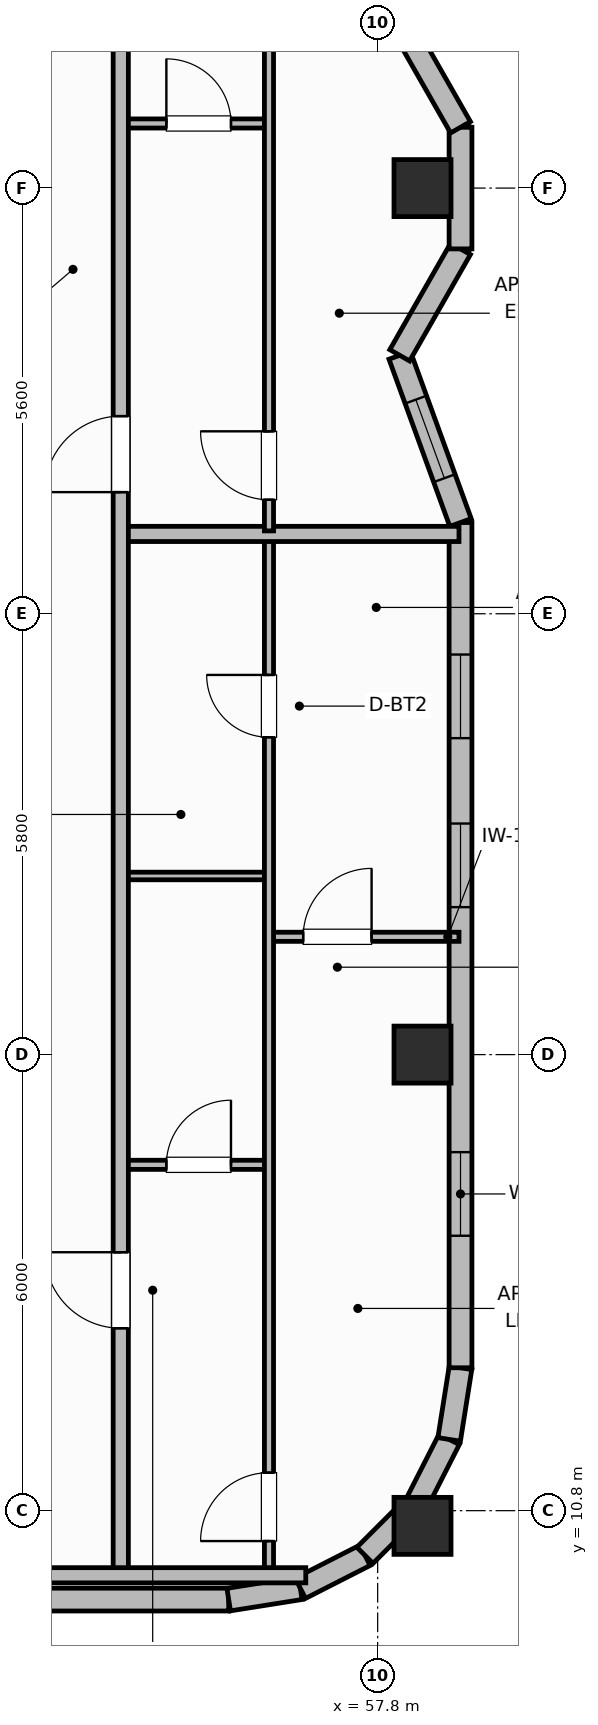
"""IFC4 building model, lengths in metres.
Left out: names, types, materials, properties, quantities, classifications, styles, units other than length and angle.
Written with IfcOpenShell. Run it as: python <this file> out.ifc"""

import sys

from ifc_helpers import new_model, si_unit, direction, frame, frame_2d, origin, origin_2d, place, context, subcontext, project, spatial, rectangle, extrude, element, fill, save


model = new_model("IFC4")
c1 = context("Model", 3, precision=1e-05, world=origin(), true_north=direction((0.0, 1.0)))
c2 = subcontext(c1, "Body", "Model", "MODEL_VIEW")
j1 = project(units=[si_unit("LENGTHUNIT", "METRE"), si_unit("PLANEANGLEUNIT", "RADIAN")], contexts=[c1])
p1 = place(None, origin())
s1 = spatial("IfcSite", under=j1, at=p1, CompositionType="ELEMENT")
p2 = place(p1, origin())
s2 = spatial("IfcBuilding", under=s1, at=p2, CompositionType="ELEMENT")
p3 = place(p2, frame((0.0, 0.0, 267.6)))
s3 = spatial("IfcBuildingStorey", under=s2, at=p3, CompositionType="ELEMENT", Elevation=267.6)
for number, where, z_axis, x_axis in (
    (1, (58.39, 10.6, 0.0), (0.0, 0.0, 1.0), (1.0, 0.0, 0.0)),
    (2, (58.39, 16.8, 0.0), (0.0, 0.0, 1.0), (1.0, 0.0, 0.0)),
    (3, (58.39, 28.2, 0.0), (0.0, 0.0, 1.0), (1.0, 0.0, 0.0)),
):
    element("IfcColumn", number, at=place(p3, frame(where, z_axis=z_axis, x_axis=x_axis)), inside=s3, PredefinedType="COLUMN", context=c2, shape_type="SweptSolid", body=[
        extrude(rectangle(XDim=0.75, YDim=0.75, at=origin_2d()), origin(), (0.0, 0.0, 1.0), 3.7),
    ])
p4 = place(p3, frame((22.56, 9.63, 0.0), z_axis=(0.0, 0.0, 1.0), x_axis=(1.0, 0.0, 0.0)))
e4 = element("IfcWall", 4, at=p4, inside=s3, PredefinedType="SOLIDWALL", context=c2, shape_type="SweptSolid", body=[
    extrude(rectangle(XDim=33.28, YDim=0.3, at=frame_2d((16.64, 0.0))), origin(), (0.0, 0.0, 1.0), 2.73),
])
p5 = place(p4, frame((4.311, 0.0, 0.76)))
e5 = element("IfcOpeningElement", 5, at=p5, cuts=e4, PredefinedType="OPENING", context=c2, shape_type="SweptSolid", body=[
    extrude(rectangle(XDim=1.4, YDim=1.85, at=frame_2d((0.7, 0.925))), frame((0.0, 0.16, 0.0), z_axis=(0.0, -1.0, 0.0), x_axis=(1.0, 0.0, 0.0)), (0.0, 0.0, 1.0), 0.32),
])
p6 = place(p4, frame((7.218, 0.0, 0.76)))
e6 = element("IfcOpeningElement", 6, at=p6, cuts=e4, PredefinedType="OPENING", context=c2, shape_type="SweptSolid", body=[
    extrude(rectangle(XDim=1.4, YDim=1.85, at=frame_2d((0.7, 0.925))), frame((0.0, 0.16, 0.0), z_axis=(0.0, -1.0, 0.0), x_axis=(1.0, 0.0, 0.0)), (0.0, 0.0, 1.0), 0.32),
])
p7 = place(p4, frame((9.775, 0.0, 0.76)))
e7 = element("IfcOpeningElement", 7, at=p7, cuts=e4, PredefinedType="OPENING", context=c2, shape_type="SweptSolid", body=[
    extrude(rectangle(XDim=1.4, YDim=1.85, at=frame_2d((0.7, 0.925))), frame((0.0, 0.16, 0.0), z_axis=(0.0, -1.0, 0.0), x_axis=(1.0, 0.0, 0.0)), (0.0, 0.0, 1.0), 0.32),
])
p8 = place(p4, frame((14.083, 0.0, 0.76)))
e8 = element("IfcOpeningElement", 8, at=p8, cuts=e4, PredefinedType="OPENING", context=c2, shape_type="SweptSolid", body=[
    extrude(rectangle(XDim=1.4, YDim=1.85, at=frame_2d((0.7, 0.925))), frame((0.0, 0.16, 0.0), z_axis=(0.0, -1.0, 0.0), x_axis=(1.0, 0.0, 0.0)), (0.0, 0.0, 1.0), 0.32),
])
p9 = place(p4, frame((15.94, 0.0, 0.76)))
e9 = element("IfcOpeningElement", 9, at=p9, cuts=e4, PredefinedType="OPENING", context=c2, shape_type="SweptSolid", body=[
    extrude(rectangle(XDim=1.4, YDim=1.85, at=frame_2d((0.7, 0.925))), frame((0.0, 0.16, 0.0), z_axis=(0.0, -1.0, 0.0), x_axis=(1.0, 0.0, 0.0)), (0.0, 0.0, 1.0), 0.32),
])
p10 = place(p4, frame((17.797, 0.0, 0.76)))
e10 = element("IfcOpeningElement", 10, at=p10, cuts=e4, PredefinedType="OPENING", context=c2, shape_type="SweptSolid", body=[
    extrude(rectangle(XDim=1.4, YDim=1.85, at=frame_2d((0.7, 0.925))), frame((0.0, 0.16, 0.0), z_axis=(0.0, -1.0, 0.0), x_axis=(1.0, 0.0, 0.0)), (0.0, 0.0, 1.0), 0.32),
])
p11 = place(p4, frame((22.104, 0.0, 0.76)))
e11 = element("IfcOpeningElement", 11, at=p11, cuts=e4, PredefinedType="OPENING", context=c2, shape_type="SweptSolid", body=[
    extrude(rectangle(XDim=1.4, YDim=1.85, at=frame_2d((0.7, 0.925))), frame((0.0, 0.16, 0.0), z_axis=(0.0, -1.0, 0.0), x_axis=(1.0, 0.0, 0.0)), (0.0, 0.0, 1.0), 0.32),
])
p12 = place(p4, frame((24.662, 0.0, 0.76)))
e12 = element("IfcOpeningElement", 12, at=p12, cuts=e4, PredefinedType="OPENING", context=c2, shape_type="SweptSolid", body=[
    extrude(rectangle(XDim=1.4, YDim=1.85, at=frame_2d((0.7, 0.925))), frame((0.0, 0.16, 0.0), z_axis=(0.0, -1.0, 0.0), x_axis=(1.0, 0.0, 0.0)), (0.0, 0.0, 1.0), 0.32),
])
p13 = place(p4, frame((27.569, 0.0, 0.76)))
e13 = element("IfcOpeningElement", 13, at=p13, cuts=e4, PredefinedType="OPENING", context=c2, shape_type="SweptSolid", body=[
    extrude(rectangle(XDim=1.4, YDim=1.85, at=frame_2d((0.7, 0.925))), frame((0.0, 0.16, 0.0), z_axis=(0.0, -1.0, 0.0), x_axis=(1.0, 0.0, 0.0)), (0.0, 0.0, 1.0), 0.32),
])
p14 = place(p3, frame((55.84, 9.63, 0.0), z_axis=(0.0, 0.0, 1.0), x_axis=(0.987663181641, 0.156593229835, 0.0)))
e14 = element("IfcWall", 14, at=p14, inside=s3, PredefinedType="SOLIDWALL", context=c2, shape_type="SweptSolid", body=[
    extrude(rectangle(XDim=0.954, YDim=0.3, at=frame_2d((0.477, 0.0))), origin(), (0.0, 0.0, 1.0), 2.73),
])
for number, where, z_axis, x_axis in (
    (15, (56.782, 9.779, 0.0), (0.0, 0.0, 1.0), (0.891, 0.454, 0.0)),
    (16, (57.633, 10.212, 0.0), (0.0, 0.0, 1.0), (0.707, 0.707, 0.0)),
    (17, (58.308, 10.887, 0.0), (0.0, 0.0, 1.0), (0.454, 0.891, 0.0)),
):
    element("IfcWall", number, at=place(p3, frame(where, z_axis=z_axis, x_axis=x_axis)), inside=s3, PredefinedType="SOLIDWALL", context=c2, shape_type="SweptSolid", body=[
        extrude(rectangle(XDim=0.954, YDim=0.3, at=frame_2d((0.477, 0.0))), origin(), (0.0, 0.0, 1.0), 2.73),
    ])
p15 = place(p3, frame((58.741, 11.738, 0.0), z_axis=(0.0, 0.0, 1.0), x_axis=(0.156343617883, 0.987702725088, 0.0)))
e18 = element("IfcWall", 18, at=p15, inside=s3, PredefinedType="SOLIDWALL", context=c2, shape_type="SweptSolid", body=[
    extrude(rectangle(XDim=0.954, YDim=0.3, at=frame_2d((0.477, 0.0))), origin(), (0.0, 0.0, 1.0), 2.73),
])
p16 = place(p3, frame((58.89, 12.68, 0.0), z_axis=(0.0, 0.0, 1.0), x_axis=(0.0, 1.0, 0.0)))
e19 = element("IfcWall", 19, at=p16, inside=s3, PredefinedType="SOLIDWALL", context=c2, shape_type="SweptSolid", body=[
    extrude(rectangle(XDim=11.12, YDim=0.3, at=frame_2d((5.56, 0.0))), origin(), (0.0, 0.0, 1.0), 2.73),
])
p17 = place(p16, frame((1.737, 0.0, 0.95)))
e20 = element("IfcOpeningElement", 20, at=p17, cuts=e19, PredefinedType="OPENING", context=c2, shape_type="SweptSolid", body=[
    extrude(rectangle(XDim=1.1, YDim=1.65, at=frame_2d((0.55, 0.825))), frame((0.0, 0.16, 0.0), z_axis=(0.0, -1.0, 0.0), x_axis=(1.0, 0.0, 0.0)), (0.0, 0.0, 1.0), 0.32),
])
p18 = place(p16, frame((6.06, 0.0, 0.95)))
e21 = element("IfcOpeningElement", 21, at=p18, cuts=e19, PredefinedType="OPENING", context=c2, shape_type="SweptSolid", body=[
    extrude(rectangle(XDim=1.1, YDim=1.65, at=frame_2d((0.55, 0.825))), frame((0.0, 0.16, 0.0), z_axis=(0.0, -1.0, 0.0), x_axis=(1.0, 0.0, 0.0)), (0.0, 0.0, 1.0), 0.32),
])
p19 = place(p16, frame((8.283, 0.0, 0.95)))
e22 = element("IfcOpeningElement", 22, at=p19, cuts=e19, PredefinedType="OPENING", context=c2, shape_type="SweptSolid", body=[
    extrude(rectangle(XDim=1.1, YDim=1.65, at=frame_2d((0.55, 0.825))), frame((0.0, 0.16, 0.0), z_axis=(0.0, -1.0, 0.0), x_axis=(1.0, 0.0, 0.0)), (0.0, 0.0, 1.0), 0.32),
])
p20 = place(p3, frame((58.89, 23.8, 0.0), z_axis=(0.0, 0.0, 1.0), x_axis=(-0.341676068702, 0.939817782379, 0.0)))
e23 = element("IfcWall", 23, at=p20, inside=s3, PredefinedType="SOLIDWALL", context=c2, shape_type="SweptSolid", body=[
    extrude(rectangle(XDim=2.341, YDim=0.3, at=frame_2d((1.17, 0.0))), origin(), (0.0, 0.0, 1.0), 2.73),
])
p21 = place(p20, frame((0.621, 0.0, 0.92)))
e24 = element("IfcOpeningElement", 24, at=p21, cuts=e23, PredefinedType="OPENING", context=c2, shape_type="SweptSolid", body=[
    extrude(rectangle(XDim=1.1, YDim=1.65, at=frame_2d((0.55, 0.825))), frame((0.0, 0.16, 0.0), z_axis=(0.0, -1.0, 0.0), x_axis=(1.0, 0.0, 0.0)), (0.0, 0.0, 1.0), 0.32),
])
p22 = place(p3, frame((58.09, 26.0, 0.0), z_axis=(0.0, 0.0, 1.0), x_axis=(0.496073707015, 0.868280413927, 0.0)))
e25 = element("IfcWall", 25, at=p22, inside=s3, PredefinedType="SOLIDWALL", context=c2, shape_type="SweptSolid", body=[
    extrude(rectangle(XDim=1.612, YDim=0.3, at=frame_2d((0.806, 0.0))), origin(), (0.0, 0.0, 1.0), 2.73),
])
p23 = place(p3, frame((58.89, 27.4, 0.0), z_axis=(0.0, 0.0, 1.0), x_axis=(0.0, 1.0, 0.0)))
e26 = element("IfcWall", 26, at=p23, inside=s3, PredefinedType="SOLIDWALL", context=c2, shape_type="SweptSolid", body=[
    extrude(rectangle(XDim=1.6, YDim=0.3, at=frame_2d((0.8, 0.0))), origin(), (0.0, 0.0, 1.0), 2.73),
])
p24 = place(p3, frame((58.89, 29.0, 0.0), z_axis=(0.0, 0.0, 1.0), x_axis=(-0.496073707015, 0.868280413927, 0.0)))
e27 = element("IfcWall", 27, at=p24, inside=s3, PredefinedType="SOLIDWALL", context=c2, shape_type="SweptSolid", body=[
    extrude(rectangle(XDim=1.612, YDim=0.3, at=frame_2d((0.806, 0.0))), origin(), (0.0, 0.0, 1.0), 2.73),
])
p25 = place(p3, frame((54.42, 15.35, 0.0), z_axis=(0.0, 0.0, 1.0), x_axis=(1.0, 0.0, 0.0)))
e28 = element("IfcWall", 28, at=p25, inside=s3, PredefinedType="PARTITIONING", context=c2, shape_type="SweptSolid", body=[
    extrude(rectangle(XDim=1.95, YDim=0.12, at=frame_2d((0.975, 0.0))), origin(), (0.0, 0.0, 1.0), 2.56),
])
p26 = place(p25, frame((0.6, 0.0, 0.0)))
e29 = element("IfcOpeningElement", 29, at=p26, cuts=e28, PredefinedType="OPENING", context=c2, shape_type="SweptSolid", body=[
    extrude(rectangle(XDim=0.85, YDim=2.1, at=frame_2d((0.425, 1.05))), frame((0.0, 0.07, 0.0), z_axis=(0.0, -1.0, 0.0), x_axis=(1.0, 0.0, 0.0)), (0.0, 0.0, 1.0), 0.14),
])
p27 = place(p3, frame((54.42, 19.15, 0.0), z_axis=(0.0, 0.0, 1.0), x_axis=(1.0, 0.0, 0.0)))
e30 = element("IfcWall", 30, at=p27, inside=s3, PredefinedType="PARTITIONING", context=c2, shape_type="SweptSolid", body=[
    extrude(rectangle(XDim=1.95, YDim=0.1, at=frame_2d((0.975, 0.0))), origin(), (0.0, 0.0, 1.0), 2.56),
])
p28 = place(p3, frame((56.37, 18.35, 0.0), z_axis=(0.0, 0.0, 1.0), x_axis=(1.0, 0.0, 0.0)))
e31 = element("IfcWall", 31, at=p28, inside=s3, PredefinedType="PARTITIONING", context=c2, shape_type="SweptSolid", body=[
    extrude(rectangle(XDim=2.5, YDim=0.12, at=frame_2d((1.25, 0.0))), origin(), (0.0, 0.0, 1.0), 2.56),
])
p29 = place(p28, frame((0.45, 0.0, 0.0)))
e32 = element("IfcOpeningElement", 32, at=p29, cuts=e31, PredefinedType="OPENING", context=c2, shape_type="SweptSolid", body=[
    extrude(rectangle(XDim=0.9, YDim=2.1, at=frame_2d((0.45, 1.05))), frame((0.0, 0.07, 0.0), z_axis=(0.0, -1.0, 0.0), x_axis=(1.0, 0.0, 0.0)), (0.0, 0.0, 1.0), 0.14),
])
p30 = place(p3, frame((56.37, 9.99, 0.0), z_axis=(0.0, 0.0, 1.0), x_axis=(0.0, 1.0, 0.0)))
e33 = element("IfcWall", 33, at=p30, inside=s3, PredefinedType="PARTITIONING", context=c2, shape_type="SweptSolid", body=[
    extrude(rectangle(XDim=13.62, YDim=0.12, at=frame_2d((6.81, 0.0))), origin(), (0.0, 0.0, 1.0), 2.56),
])
p31 = place(p30, frame((0.41, 0.0, 0.0)))
e34 = element("IfcOpeningElement", 34, at=p31, cuts=e33, PredefinedType="OPENING", context=c2, shape_type="SweptSolid", body=[
    extrude(rectangle(XDim=0.9, YDim=2.1, at=frame_2d((0.45, 1.05))), frame((0.0, 0.07, 0.0), z_axis=(0.0, -1.0, 0.0), x_axis=(1.0, 0.0, 0.0)), (0.0, 0.0, 1.0), 0.14),
])
p32 = place(p30, frame((10.985, 0.0, 0.0)))
e35 = element("IfcOpeningElement", 35, at=p32, cuts=e33, PredefinedType="OPENING", context=c2, shape_type="SweptSolid", body=[
    extrude(rectangle(XDim=0.82, YDim=2.08, at=frame_2d((0.41, 1.04))), frame((0.0, 0.07, 0.0), z_axis=(0.0, -1.0, 0.0), x_axis=(1.0, 0.0, 0.0)), (0.0, 0.0, 1.0), 0.14),
])
p33 = place(p3, frame((54.42, 23.65, 0.0), z_axis=(0.0, 0.0, 1.0), x_axis=(1.0, 0.0, 0.0)))
e36 = element("IfcWall", 36, at=p33, inside=s3, PredefinedType="PARTITIONING", context=c2, shape_type="SweptSolid", body=[
    extrude(rectangle(XDim=4.45, YDim=0.2, at=frame_2d((2.225, 0.0))), origin(), (0.0, 0.0, 1.0), 2.56),
])
p34 = place(p3, frame((54.42, 29.05, 0.0), z_axis=(0.0, 0.0, 1.0), x_axis=(1.0, 0.0, 0.0)))
e37 = element("IfcWall", 37, at=p34, inside=s3, PredefinedType="PARTITIONING", context=c2, shape_type="SweptSolid", body=[
    extrude(rectangle(XDim=1.95, YDim=0.12, at=frame_2d((0.975, 0.0))), origin(), (0.0, 0.0, 1.0), 2.56),
])
p35 = place(p34, frame((0.6, 0.0, 0.0)))
e38 = element("IfcOpeningElement", 38, at=p35, cuts=e37, PredefinedType="OPENING", context=c2, shape_type="SweptSolid", body=[
    extrude(rectangle(XDim=0.85, YDim=2.1, at=frame_2d((0.425, 1.05))), frame((0.0, 0.07, 0.0), z_axis=(0.0, -1.0, 0.0), x_axis=(1.0, 0.0, 0.0)), (0.0, 0.0, 1.0), 0.14),
])
p36 = place(p3, frame((56.37, 23.69, 0.0), z_axis=(0.0, 0.0, 1.0), x_axis=(0.0, 1.0, 0.0)))
e39 = element("IfcWall", 39, at=p36, inside=s3, PredefinedType="PARTITIONING", context=c2, shape_type="SweptSolid", body=[
    extrude(rectangle(XDim=22.72, YDim=0.12, at=frame_2d((11.36, 0.0))), origin(), (0.0, 0.0, 1.0), 2.56),
])
p37 = place(p36, frame((0.41, 0.0, 0.0)))
e40 = element("IfcOpeningElement", 40, at=p37, cuts=e39, PredefinedType="OPENING", context=c2, shape_type="SweptSolid", body=[
    extrude(rectangle(XDim=0.9, YDim=2.1, at=frame_2d((0.45, 1.05))), frame((0.0, 0.07, 0.0), z_axis=(0.0, -1.0, 0.0), x_axis=(1.0, 0.0, 0.0)), (0.0, 0.0, 1.0), 0.14),
])
p38 = place(p36, frame((13.185, 0.0, 0.0)))
e41 = element("IfcOpeningElement", 41, at=p38, cuts=e39, PredefinedType="OPENING", context=c2, shape_type="SweptSolid", body=[
    extrude(rectangle(XDim=0.82, YDim=2.08, at=frame_2d((0.41, 1.04))), frame((0.0, 0.07, 0.0), z_axis=(0.0, -1.0, 0.0), x_axis=(1.0, 0.0, 0.0)), (0.0, 0.0, 1.0), 0.14),
])
p39 = place(p3, frame((54.42, 9.95, 0.0), z_axis=(0.0, 0.0, 1.0), x_axis=(0.0, 1.0, 0.0)))
e42 = element("IfcWall", 42, at=p39, inside=s3, PredefinedType="PARTITIONING", context=c2, shape_type="SweptSolid", body=[
    extrude(rectangle(XDim=36.5, YDim=0.2, at=frame_2d((18.25, 0.0))), origin(), (0.0, 0.0, 1.0), 2.56),
])
p40 = place(p39, frame((3.25, 0.0, 0.0)))
e43 = element("IfcOpeningElement", 43, at=p40, cuts=e42, PredefinedType="OPENING", context=c2, shape_type="SweptSolid", body=[
    extrude(rectangle(XDim=1.0, YDim=2.15, at=frame_2d((0.5, 1.075))), frame((0.0, 0.11, 0.0), z_axis=(0.0, -1.0, 0.0), x_axis=(1.0, 0.0, 0.0)), (0.0, 0.0, 1.0), 0.22),
])
p41 = place(p39, frame((14.25, 0.0, 0.0)))
e44 = element("IfcOpeningElement", 44, at=p41, cuts=e42, PredefinedType="OPENING", context=c2, shape_type="SweptSolid", body=[
    extrude(rectangle(XDim=1.0, YDim=2.15, at=frame_2d((0.5, 1.075))), frame((0.0, 0.11, 0.0), z_axis=(0.0, -1.0, 0.0), x_axis=(1.0, 0.0, 0.0)), (0.0, 0.0, 1.0), 0.22),
])
p42 = place(p3, frame((53.1, 9.95, 0.0), z_axis=(0.0, 0.0, 1.0), x_axis=(1.0, 0.0, 0.0)))
e45 = element("IfcWall", 45, at=p42, inside=s3, PredefinedType="PARTITIONING", context=c2, shape_type="SweptSolid", body=[
    extrude(rectangle(XDim=3.754, YDim=0.2, at=frame_2d((1.877, 0.0))), origin(), (0.0, 0.0, 1.0), 2.56),
])
p43 = place(p17, origin())
e46 = element("IfcWindow", 46, at=p43, inside=s3, PartitioningType="SINGLE_PANEL", PredefinedType="WINDOW", context=c2, shape_type="SweptSolid", body=[
    extrude(rectangle(XDim=1.1, YDim=1.65, at=frame_2d((0.55, 0.825))), frame((0.0, 0.03, 0.0), z_axis=(0.0, -1.0, 0.0), x_axis=(1.0, 0.0, 0.0)), (0.0, 0.0, 1.0), 0.06),
])
fill(e20, e46)
p44 = place(p18, origin())
e47 = element("IfcWindow", 47, at=p44, inside=s3, PartitioningType="SINGLE_PANEL", PredefinedType="WINDOW", context=c2, shape_type="SweptSolid", body=[
    extrude(rectangle(XDim=1.1, YDim=1.65, at=frame_2d((0.55, 0.825))), frame((0.0, 0.03, 0.0), z_axis=(0.0, -1.0, 0.0), x_axis=(1.0, 0.0, 0.0)), (0.0, 0.0, 1.0), 0.06),
])
fill(e21, e47)
p45 = place(p19, origin())
e48 = element("IfcWindow", 48, at=p45, inside=s3, PartitioningType="SINGLE_PANEL", PredefinedType="WINDOW", context=c2, shape_type="SweptSolid", body=[
    extrude(rectangle(XDim=1.1, YDim=1.65, at=frame_2d((0.55, 0.825))), frame((0.0, 0.03, 0.0), z_axis=(0.0, -1.0, 0.0), x_axis=(1.0, 0.0, 0.0)), (0.0, 0.0, 1.0), 0.06),
])
fill(e22, e48)
p46 = place(p21, origin())
e49 = element("IfcWindow", 49, at=p46, inside=s3, PartitioningType="SINGLE_PANEL", PredefinedType="WINDOW", context=c2, shape_type="SweptSolid", body=[
    extrude(rectangle(XDim=1.1, YDim=1.65, at=frame_2d((0.55, 0.825))), frame((0.0, 0.03, 0.0), z_axis=(0.0, -1.0, 0.0), x_axis=(1.0, 0.0, 0.0)), (0.0, 0.0, 1.0), 0.06),
])
fill(e24, e49)
p47 = place(p26, origin())
e50 = element("IfcDoor", 50, at=p47, inside=s3, OperationType="SINGLE_SWING_RIGHT", PredefinedType="DOOR", context=c2, shape_type="SweptSolid", body=[
    extrude(rectangle(XDim=0.85, YDim=2.1, at=frame_2d((0.425, 1.05))), frame((0.0, 0.025, 0.0), z_axis=(0.0, -1.0, 0.0), x_axis=(1.0, 0.0, 0.0)), (0.0, 0.0, 1.0), 0.05),
])
fill(e29, e50)
p48 = place(p29, origin())
e51 = element("IfcDoor", 51, at=p48, inside=s3, OperationType="SINGLE_SWING_RIGHT", PredefinedType="DOOR", context=c2, shape_type="SweptSolid", body=[
    extrude(rectangle(XDim=0.9, YDim=2.1, at=frame_2d((0.45, 1.05))), frame((0.0, 0.025, 0.0), z_axis=(0.0, -1.0, 0.0), x_axis=(1.0, 0.0, 0.0)), (0.0, 0.0, 1.0), 0.05),
])
fill(e32, e51)
p49 = place(p31, origin())
e52 = element("IfcDoor", 52, at=p49, inside=s3, OperationType="SINGLE_SWING_LEFT", PredefinedType="DOOR", context=c2, shape_type="SweptSolid", body=[
    extrude(rectangle(XDim=0.9, YDim=2.1, at=frame_2d((0.45, 1.05))), frame((0.0, 0.025, 0.0), z_axis=(0.0, -1.0, 0.0), x_axis=(1.0, 0.0, 0.0)), (0.0, 0.0, 1.0), 0.05),
])
fill(e34, e52)
p50 = place(p32, origin())
e53 = element("IfcDoor", 53, at=p50, inside=s3, OperationType="SINGLE_SWING_RIGHT", PredefinedType="DOOR", context=c2, shape_type="SweptSolid", body=[
    extrude(rectangle(XDim=0.82, YDim=2.08, at=frame_2d((0.41, 1.04))), frame((0.0, 0.025, 0.0), z_axis=(0.0, -1.0, 0.0), x_axis=(1.0, 0.0, 0.0)), (0.0, 0.0, 1.0), 0.05),
])
fill(e35, e53)
p51 = place(p35, origin())
e54 = element("IfcDoor", 54, at=p51, inside=s3, OperationType="SINGLE_SWING_LEFT", PredefinedType="DOOR", context=c2, shape_type="SweptSolid", body=[
    extrude(rectangle(XDim=0.85, YDim=2.1, at=frame_2d((0.425, 1.05))), frame((0.0, 0.025, 0.0), z_axis=(0.0, -1.0, 0.0), x_axis=(1.0, 0.0, 0.0)), (0.0, 0.0, 1.0), 0.05),
])
fill(e38, e54)
p52 = place(p37, origin())
e55 = element("IfcDoor", 55, at=p52, inside=s3, OperationType="SINGLE_SWING_RIGHT", PredefinedType="DOOR", context=c2, shape_type="SweptSolid", body=[
    extrude(rectangle(XDim=0.9, YDim=2.1, at=frame_2d((0.45, 1.05))), frame((0.0, 0.025, 0.0), z_axis=(0.0, -1.0, 0.0), x_axis=(1.0, 0.0, 0.0)), (0.0, 0.0, 1.0), 0.05),
])
fill(e40, e55)
p53 = place(p40, origin())
e56 = element("IfcDoor", 56, at=p53, inside=s3, OperationType="SINGLE_SWING_RIGHT", PredefinedType="DOOR", context=c2, shape_type="SweptSolid", body=[
    extrude(rectangle(XDim=1.0, YDim=2.15, at=frame_2d((0.5, 1.075))), frame((0.0, 0.025, 0.0), z_axis=(0.0, -1.0, 0.0), x_axis=(1.0, 0.0, 0.0)), (0.0, 0.0, 1.0), 0.05),
])
fill(e43, e56)
p54 = place(p41, origin())
e57 = element("IfcDoor", 57, at=p54, inside=s3, OperationType="SINGLE_SWING_LEFT", PredefinedType="DOOR", context=c2, shape_type="SweptSolid", body=[
    extrude(rectangle(XDim=1.0, YDim=2.15, at=frame_2d((0.5, 1.075))), frame((0.0, 0.025, 0.0), z_axis=(0.0, -1.0, 0.0), x_axis=(1.0, 0.0, 0.0)), (0.0, 0.0, 1.0), 0.05),
])
fill(e44, e57)
save(model, sys.argv[1])
